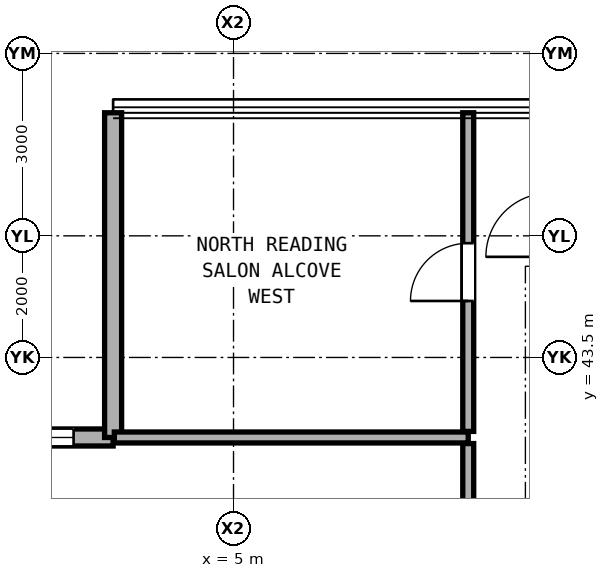
"""IFC4 building model, lengths in metres.
Left out: names, types, materials, properties, quantities, classifications, styles, units other than length and angle.
Written with IfcOpenShell. Run it as: python <this file> out.ifc"""

import sys

from ifc_helpers import new_model, si_unit, direction, frame, frame_2d, origin, place, context, subcontext, project, spatial, rectangle, extrude, element, fill, save


model = new_model("IFC4")
c1 = context("Model", 3, precision=1e-05, world=origin(), true_north=direction((0.0, 1.0)))
c2 = subcontext(c1, "Body", "Model", "MODEL_VIEW")
j1 = project(units=[si_unit("LENGTHUNIT", "METRE"), si_unit("PLANEANGLEUNIT", "RADIAN")], contexts=[c1])
p1 = place(None, origin())
s1 = spatial("IfcSite", under=j1, at=p1, CompositionType="ELEMENT")
p2 = place(p1, origin())
s2 = spatial("IfcBuilding", under=s1, at=p2, CompositionType="ELEMENT")
p3 = place(p2, frame((0.0, 0.0, 78.5)))
s3 = spatial("IfcBuildingStorey", under=s2, at=p3, CompositionType="ELEMENT", Elevation=78.5)
p4 = place(p3, frame((3.02, 42.184, 0.0), z_axis=(0.0, 0.0, 1.0), x_axis=(-1.0, 0.0, 0.0)))
e1 = element("IfcWall", 1, at=p4, inside=s3, PredefinedType="SOLIDWALL", context=c2, shape_type="SweptSolid", body=[
    extrude(rectangle(XDim=5.34, YDim=0.28, at=frame_2d((2.67, 0.0))), origin(), (0.0, 0.0, 1.0), 2.56),
])
p5 = place(p4, frame((0.65, 0.0, 0.41)))
e2 = element("IfcOpeningElement", 2, at=p5, cuts=e1, PredefinedType="OPENING", context=c2, shape_type="SweptSolid", body=[
    extrude(rectangle(XDim=1.1, YDim=2.0, at=frame_2d((0.55, 1.0))), frame((0.0, 0.15, 0.0), z_axis=(0.0, -1.0, 0.0), x_axis=(1.0, 0.0, 0.0)), (0.0, 0.0, 1.0), 0.3),
])
p6 = place(p3, frame((3.02, 47.524, 0.0), z_axis=(0.0, 0.0, 1.0), x_axis=(0.0, -1.0, 0.0)))
e3 = element("IfcWall", 3, at=p6, inside=s3, PredefinedType="SOLIDWALL", context=c2, shape_type="SweptSolid", body=[
    extrude(rectangle(XDim=5.34, YDim=0.28, at=frame_2d((2.67, 0.0))), origin(), (0.0, 0.0, 1.0), 2.56),
])
p7 = place(p3, frame((3.04, 42.184, 0.0), z_axis=(0.0, 0.0, 1.0), x_axis=(1.0, 0.0, 0.0)))
e4 = element("IfcWall", 4, at=p7, inside=s3, PredefinedType="PARTITIONING", context=c2, shape_type="SweptSolid", body=[
    extrude(rectangle(XDim=5.82, YDim=0.18, at=frame_2d((2.91, 0.0))), origin(), (0.0, 0.0, 1.0), 2.94),
])
p8 = place(p3, frame((8.86, 32.225, 0.0), z_axis=(0.0, 0.0, 1.0), x_axis=(0.0, 1.0, 0.0)))
e5 = element("IfcWall", 5, at=p8, inside=s3, PredefinedType="PARTITIONING", context=c2, shape_type="SweptSolid", body=[
    extrude(rectangle(XDim=9.859, YDim=0.18, at=frame_2d((4.929, 0.0))), origin(), (0.0, 0.0, 1.0), 2.316),
])
p9 = place(p8, frame((4.405, 0.0, 0.0)))
e6 = element("IfcOpeningElement", 6, at=p9, cuts=e5, PredefinedType="OPENING", context=c2, shape_type="SweptSolid", body=[
    extrude(rectangle(XDim=1.05, YDim=2.2, at=frame_2d((0.525, 1.1))), frame((0.0, 0.1, 0.0), z_axis=(0.0, -1.0, 0.0), x_axis=(1.0, 0.0, 0.0)), (0.0, 0.0, 1.0), 0.2),
])
p10 = place(p3, frame((8.86, 42.284, 0.0), z_axis=(0.0, 0.0, 1.0), x_axis=(0.0, 1.0, 0.0)))
e7 = element("IfcWall", 7, at=p10, inside=s3, PredefinedType="PARTITIONING", context=c2, shape_type="SweptSolid", body=[
    extrude(rectangle(XDim=5.24, YDim=0.18, at=frame_2d((2.62, 0.0))), origin(), (0.0, 0.0, 1.0), 2.94),
])
p11 = place(p10, frame((2.145, 0.0, 0.0)))
e8 = element("IfcOpeningElement", 8, at=p11, cuts=e7, PredefinedType="OPENING", context=c2, shape_type="SweptSolid", body=[
    extrude(rectangle(XDim=0.95, YDim=2.15, at=frame_2d((0.475, 1.075))), frame((0.0, 0.1, 0.0), z_axis=(0.0, -1.0, 0.0), x_axis=(1.0, 0.0, 0.0)), (0.0, 0.0, 1.0), 0.2),
])
p12 = place(p5, origin())
e9 = element("IfcWindow", 9, at=p12, inside=s3, PartitioningType="SINGLE_PANEL", PredefinedType="WINDOW", context=c2, shape_type="SweptSolid", body=[
    extrude(rectangle(XDim=1.1, YDim=2.0, at=frame_2d((0.55, 1.0))), frame((0.0, 0.03, 0.0), z_axis=(0.0, -1.0, 0.0), x_axis=(1.0, 0.0, 0.0)), (0.0, 0.0, 1.0), 0.06),
])
fill(e2, e9)
p13 = place(p11, origin())
e10 = element("IfcDoor", 10, at=p13, inside=s3, OperationType="SINGLE_SWING_LEFT", PredefinedType="DOOR", context=c2, shape_type="SweptSolid", body=[
    extrude(rectangle(XDim=0.95, YDim=2.15, at=frame_2d((0.475, 1.075))), frame((0.0, 0.025, 0.0), z_axis=(0.0, -1.0, 0.0), x_axis=(1.0, 0.0, 0.0)), (0.0, 0.0, 1.0), 0.05),
])
fill(e8, e10)
save(model, sys.argv[1])
